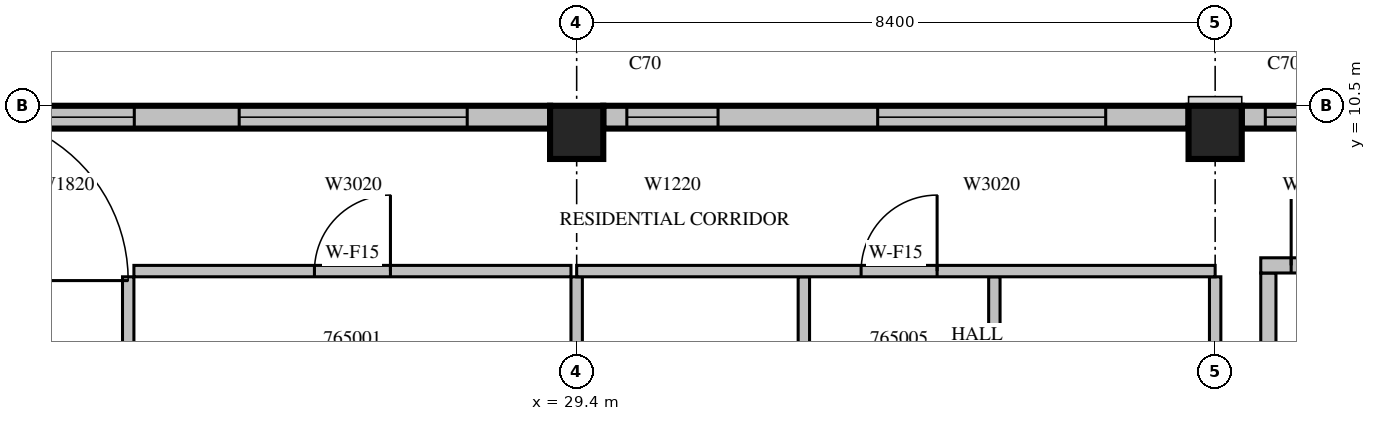
"""IFC4 building model, lengths in metres.
Left out: names, types, materials, properties, quantities, classifications, styles, units other than length and angle.
Written with IfcOpenShell. Run it as: python <this file> out.ifc"""

import sys

from ifc_helpers import new_model, si_unit, direction, frame, frame_2d, origin, origin_2d, place, context, subcontext, project, spatial, rectangle, extrude, source, transform, mapped, element, fill, save


model = new_model("IFC4")
c1 = context("Model", 3, precision=1e-05, world=origin(), true_north=direction((0.0, 1.0)))
c2 = subcontext(c1, "Body", "Model", "MODEL_VIEW")
j1 = project(units=[si_unit("LENGTHUNIT", "METRE"), si_unit("PLANEANGLEUNIT", "RADIAN")], contexts=[c1])
p1 = place(None, origin())
s1 = spatial("IfcSite", under=j1, at=p1, CompositionType="ELEMENT")
p2 = place(p1, origin())
s2 = spatial("IfcBuilding", under=s1, at=p2, CompositionType="ELEMENT")
p3 = place(p2, frame((0.0, 0.0, 288.0)))
s3 = spatial("IfcBuildingStorey", under=s2, at=p3, CompositionType="ELEMENT", Elevation=288.0)
m1 = source(origin(), c2, "Body", "SweptSolid", [
    extrude(rectangle(XDim=0.7, YDim=0.7, at=origin_2d()), origin(), (0.0, 0.0, 1.0), 3.5),
])
for number, where, z_axis, x_axis in (
    (1, (29.4, 10.15, 0.0), (0.0, 0.0, 1.0), (1.0, 0.0, 0.0)),
    (2, (37.8, 10.15, 0.0), (0.0, 0.0, 1.0), (1.0, 0.0, 0.0)),
):
    element("IfcColumn", number, at=place(p3, frame(where, z_axis=z_axis, x_axis=x_axis)), inside=s3, PredefinedType="COLUMN", context=c2, shape_type="MappedRepresentation", body=[
        mapped(m1, transform((0.0, 0.0, 0.0), scale=1.0)),
    ])
m2 = source(origin(), c2, "Body", "SweptSolid", [
    extrude(rectangle(XDim=7.7, YDim=0.3, at=frame_2d((3.85, 0.0))), origin(), (0.0, 0.0, 1.0), 3.1),
])
p4 = place(p3, frame((45.85, 10.35, 0.0), z_axis=(0.0, 0.0, 1.0), x_axis=(-1.0, 0.0, 0.0)))
e3 = element("IfcWall", 3, at=p4, inside=s3, PredefinedType="STANDARD", context=c2, shape_type="MappedRepresentation", body=[
    mapped(m2, transform((0.0, 0.0, 0.0), scale=1.0)),
])
m3 = source(origin(), c2, "Body", "SweptSolid", [
    extrude(rectangle(XDim=3.0, YDim=2.0, at=frame_2d((1.5, 1.0))), frame((0.0, 0.16, 0.0), z_axis=(0.0, -1.0, 0.0), x_axis=(1.0, 0.0, 0.0)), (0.0, 0.0, 1.0), 0.32),
])
p5 = place(p4, frame((1.09, 0.0, 0.6)))
e4 = element("IfcOpeningElement", 4, at=p5, cuts=e3, PredefinedType="OPENING", context=c2, shape_type="MappedRepresentation", body=[
    mapped(m3, transform((0.0, 0.0, 0.0), scale=1.0)),
])
m4 = source(origin(), c2, "Body", "SweptSolid", [
    extrude(rectangle(XDim=1.2, YDim=2.0, at=frame_2d((0.6, 1.0))), frame((0.0, 0.16, 0.0), z_axis=(0.0, -1.0, 0.0), x_axis=(1.0, 0.0, 0.0)), (0.0, 0.0, 1.0), 0.32),
])
p6 = place(p4, frame((6.19, 0.0, 0.6)))
e5 = element("IfcOpeningElement", 5, at=p6, cuts=e3, PredefinedType="OPENING", context=c2, shape_type="MappedRepresentation", body=[
    mapped(m4, transform((0.0, 0.0, 0.0), scale=1.0)),
])
p7 = place(p3, frame((37.45, 10.35, 0.0), z_axis=(0.0, 0.0, 1.0), x_axis=(-1.0, 0.0, 0.0)))
e6 = element("IfcWall", 6, at=p7, inside=s3, PredefinedType="STANDARD", context=c2, shape_type="MappedRepresentation", body=[
    mapped(m2, transform((0.0, 0.0, 0.0), scale=1.0)),
])
p8 = place(p7, frame((1.09, 0.0, 0.6)))
e7 = element("IfcOpeningElement", 7, at=p8, cuts=e6, PredefinedType="OPENING", context=c2, shape_type="MappedRepresentation", body=[
    mapped(m3, transform((0.0, 0.0, 0.0), scale=1.0)),
])
p9 = place(p7, frame((6.19, 0.0, 0.6)))
e8 = element("IfcOpeningElement", 8, at=p9, cuts=e6, PredefinedType="OPENING", context=c2, shape_type="MappedRepresentation", body=[
    mapped(m4, transform((0.0, 0.0, 0.0), scale=1.0)),
])
m5 = source(origin(), c2, "Body", "SweptSolid", [
    extrude(rectangle(XDim=7.45, YDim=0.3, at=frame_2d((3.725, 0.0))), origin(), (0.0, 0.0, 1.0), 3.1),
])
p10 = place(p3, frame((29.05, 10.35, 0.0), z_axis=(0.0, 0.0, 1.0), x_axis=(-1.0, 0.0, 0.0)))
e9 = element("IfcWall", 9, at=p10, inside=s3, PredefinedType="STANDARD", context=c2, shape_type="MappedRepresentation", body=[
    mapped(m5, transform((0.0, 0.0, 0.0), scale=1.0)),
])
p11 = place(p10, frame((1.09, 0.0, 0.6)))
e10 = element("IfcOpeningElement", 10, at=p11, cuts=e9, PredefinedType="OPENING", context=c2, shape_type="MappedRepresentation", body=[
    mapped(m3, transform((0.0, 0.0, 0.0), scale=1.0)),
])
m6 = source(origin(), c2, "Body", "SweptSolid", [
    extrude(rectangle(XDim=1.8, YDim=2.0, at=frame_2d((0.9, 1.0))), frame((0.0, 0.16, 0.0), z_axis=(0.0, -1.0, 0.0), x_axis=(1.0, 0.0, 0.0)), (0.0, 0.0, 1.0), 0.32),
])
p12 = place(p10, frame((5.47, 0.0, 0.6)))
e11 = element("IfcOpeningElement", 11, at=p12, cuts=e9, PredefinedType="OPENING", context=c2, shape_type="MappedRepresentation", body=[
    mapped(m6, transform((0.0, 0.0, 0.0), scale=1.0)),
])
m7 = source(origin(), c2, "Body", "SweptSolid", [
    extrude(rectangle(XDim=8.0, YDim=0.2, at=frame_2d((4.0, 0.0))), origin(), (0.0, 0.0, 1.0), 3.1),
])
p13 = place(p3, frame((38.5, 0.3, 0.0), z_axis=(0.0, 0.0, 1.0), x_axis=(0.0, 1.0, 0.0)))
e12 = element("IfcWall", 12, at=p13, inside=s3, PredefinedType="PARTITIONING", context=c2, shape_type="MappedRepresentation", body=[
    mapped(m7, transform((0.0, 0.0, 0.0), scale=1.0)),
])
m8 = source(origin(), c2, "Body", "SweptSolid", [
    extrude(rectangle(XDim=5.45, YDim=0.2, at=frame_2d((2.725, 0.0))), origin(), (0.0, 0.0, 1.0), 3.1),
])
p14 = place(p3, frame((38.4, 8.4, 0.0), z_axis=(0.0, 0.0, 1.0), x_axis=(1.0, 0.0, 0.0)))
e13 = element("IfcWall", 13, at=p14, inside=s3, PredefinedType="PARTITIONING", context=c2, shape_type="MappedRepresentation", body=[
    mapped(m8, transform((0.0, 0.0, 0.0), scale=1.0)),
])
m9 = source(origin(), c2, "Body", "SweptSolid", [
    extrude(rectangle(XDim=1.2, YDim=2.1, at=frame_2d((0.6, 1.05))), frame((0.0, 0.11, 0.0), z_axis=(0.0, -1.0, 0.0), x_axis=(1.0, 0.0, 0.0)), (0.0, 0.0, 1.0), 0.22),
])
p15 = place(p14, frame((0.4, 0.0, 0.0)))
e14 = element("IfcOpeningElement", 14, at=p15, cuts=e13, PredefinedType="OPENING", context=c2, shape_type="MappedRepresentation", body=[
    mapped(m9, transform((0.0, 0.0, 0.0), scale=1.0)),
])
m10 = source(origin(), c2, "Body", "SweptSolid", [
    extrude(rectangle(XDim=0.9, YDim=2.1, at=frame_2d((0.45, 1.05))), frame((0.0, 0.11, 0.0), z_axis=(0.0, -1.0, 0.0), x_axis=(1.0, 0.0, 0.0)), (0.0, 0.0, 1.0), 0.22),
])
p16 = place(p14, frame((3.25, 0.0, 0.0)))
e15 = element("IfcOpeningElement", 15, at=p16, cuts=e13, PredefinedType="OPENING", context=c2, shape_type="MappedRepresentation", body=[
    mapped(m10, transform((0.0, 0.0, 0.0), scale=1.0)),
])
m11 = source(origin(), c2, "Body", "SweptSolid", [
    extrude(rectangle(XDim=4.575, YDim=0.15, at=frame_2d((2.288, 0.0))), origin(), (0.0, 0.0, 1.0), 3.1),
])
p17 = place(p3, frame((23.5, 8.25, 0.0), z_axis=(0.0, 0.0, 1.0), x_axis=(0.0, -1.0, 0.0)))
e16 = element("IfcWall", 16, at=p17, inside=s3, PredefinedType="PARTITIONING", context=c2, shape_type="MappedRepresentation", body=[
    mapped(m11, transform((0.0, 0.0, 0.0), scale=1.0)),
])
m12 = source(origin(), c2, "Body", "SweptSolid", [
    extrude(rectangle(XDim=0.9, YDim=2.1, at=frame_2d((0.45, 1.05))), frame((0.0, 0.085, 0.0), z_axis=(0.0, -1.0, 0.0), x_axis=(1.0, 0.0, 0.0)), (0.0, 0.0, 1.0), 0.17),
])
p18 = place(p17, frame((2.981, 0.0, 0.0)))
e17 = element("IfcOpeningElement", 17, at=p18, cuts=e16, PredefinedType="OPENING", context=c2, shape_type="MappedRepresentation", body=[
    mapped(m12, transform((0.0, 0.0, 0.0), scale=1.0)),
])
p19 = place(p3, frame((29.4, 3.675, 0.0), z_axis=(0.0, 0.0, 1.0), x_axis=(0.0, 1.0, 0.0)))
e18 = element("IfcWall", 18, at=p19, inside=s3, PredefinedType="PARTITIONING", context=c2, shape_type="MappedRepresentation", body=[
    mapped(m11, transform((0.0, 0.0, 0.0), scale=1.0)),
])
m13 = source(origin(), c2, "Body", "SweptSolid", [
    extrude(rectangle(XDim=5.75, YDim=0.15, at=frame_2d((2.875, 0.0))), origin(), (0.0, 0.0, 1.0), 3.1),
])
p20 = place(p3, frame((29.325, 8.325, 0.0), z_axis=(0.0, 0.0, 1.0), x_axis=(-1.0, 0.0, 0.0)))
e19 = element("IfcWall", 19, at=p20, inside=s3, PredefinedType="PARTITIONING", context=c2, shape_type="MappedRepresentation", body=[
    mapped(m13, transform((0.0, 0.0, 0.0), scale=1.0)),
])
m14 = source(origin(), c2, "Body", "SweptSolid", [
    extrude(rectangle(XDim=1.0, YDim=2.1, at=frame_2d((0.5, 1.05))), frame((0.0, 0.085, 0.0), z_axis=(0.0, -1.0, 0.0), x_axis=(1.0, 0.0, 0.0)), (0.0, 0.0, 1.0), 0.17),
])
p21 = place(p20, frame((2.375, 0.0, 0.0)))
e20 = element("IfcOpeningElement", 20, at=p21, cuts=e19, PredefinedType="OPENING", context=c2, shape_type="MappedRepresentation", body=[
    mapped(m14, transform((0.0, 0.0, 0.0), scale=1.0)),
])
m15 = source(origin(), c2, "Body", "SweptSolid", [
    extrude(rectangle(XDim=3.2, YDim=0.15, at=frame_2d((1.6, 0.0))), origin(), (0.0, 0.0, 1.0), 3.1),
])
p22 = place(p3, frame((32.389, 5.05, 0.0), z_axis=(0.0, 0.0, 1.0), x_axis=(0.0, 1.0, 0.0)))
e21 = element("IfcWall", 21, at=p22, inside=s3, PredefinedType="PARTITIONING", context=c2, shape_type="MappedRepresentation", body=[
    mapped(m15, transform((0.0, 0.0, 0.0), scale=1.0)),
])
p23 = place(p22, frame((1.15, 0.0, 0.0)))
e22 = element("IfcOpeningElement", 22, at=p23, cuts=e21, PredefinedType="OPENING", context=c2, shape_type="MappedRepresentation", body=[
    mapped(m12, transform((0.0, 0.0, 0.0), scale=1.0)),
])
p24 = place(p3, frame((34.895, 5.05, 0.0), z_axis=(0.0, 0.0, 1.0), x_axis=(0.0, 1.0, 0.0)))
e23 = element("IfcWall", 23, at=p24, inside=s3, PredefinedType="PARTITIONING", context=c2, shape_type="MappedRepresentation", body=[
    mapped(m15, transform((0.0, 0.0, 0.0), scale=1.0)),
])
p25 = place(p24, frame((1.15, 0.0, 0.0)))
e24 = element("IfcOpeningElement", 24, at=p25, cuts=e23, PredefinedType="OPENING", context=c2, shape_type="MappedRepresentation", body=[
    mapped(m12, transform((0.0, 0.0, 0.0), scale=1.0)),
])
p26 = place(p3, frame((37.8, 5.05, 0.0), z_axis=(0.0, 0.0, 1.0), x_axis=(0.0, 1.0, 0.0)))
e25 = element("IfcWall", 25, at=p26, inside=s3, PredefinedType="PARTITIONING", context=c2, shape_type="MappedRepresentation", body=[
    mapped(m15, transform((0.0, 0.0, 0.0), scale=1.0)),
])
m16 = source(origin(), c2, "Body", "SweptSolid", [
    extrude(rectangle(XDim=8.4, YDim=0.15, at=frame_2d((4.2, 0.0))), origin(), (0.0, 0.0, 1.0), 3.1),
])
p27 = place(p3, frame((37.8, 8.325, 0.0), z_axis=(0.0, 0.0, 1.0), x_axis=(-1.0, 0.0, 0.0)))
e26 = element("IfcWall", 26, at=p27, inside=s3, PredefinedType="PARTITIONING", context=c2, shape_type="MappedRepresentation", body=[
    mapped(m16, transform((0.0, 0.0, 0.0), scale=1.0)),
])
p28 = place(p27, frame((3.658, 0.0, 0.0)))
e27 = element("IfcOpeningElement", 27, at=p28, cuts=e26, PredefinedType="OPENING", context=c2, shape_type="MappedRepresentation", body=[
    mapped(m14, transform((0.0, 0.0, 0.0), scale=1.0)),
])
m17 = source(origin(), c2, "Body", "SweptSolid", [
    extrude(rectangle(XDim=1.2, YDim=2.0, at=frame_2d((0.6, 1.0))), frame((0.0, 0.03, 0.0), z_axis=(0.0, -1.0, 0.0), x_axis=(1.0, 0.0, 0.0)), (0.0, 0.0, 1.0), 0.06),
])
p29 = place(p6, origin())
e28 = element("IfcWindow", 28, at=p29, inside=s3, PartitioningType="SINGLE_PANEL", PredefinedType="WINDOW", context=c2, shape_type="MappedRepresentation", body=[
    mapped(m17, transform((0.0, 0.0, 0.0), scale=1.0)),
])
fill(e5, e28)
m18 = source(origin(), c2, "Body", "SweptSolid", [
    extrude(rectangle(XDim=3.0, YDim=2.0, at=frame_2d((1.5, 1.0))), frame((0.0, 0.03, 0.0), z_axis=(0.0, -1.0, 0.0), x_axis=(1.0, 0.0, 0.0)), (0.0, 0.0, 1.0), 0.06),
])
p30 = place(p8, origin())
e29 = element("IfcWindow", 29, at=p30, inside=s3, PartitioningType="SINGLE_PANEL", PredefinedType="WINDOW", context=c2, shape_type="MappedRepresentation", body=[
    mapped(m18, transform((0.0, 0.0, 0.0), scale=1.0)),
])
fill(e7, e29)
p31 = place(p9, origin())
e30 = element("IfcWindow", 30, at=p31, inside=s3, PartitioningType="SINGLE_PANEL", PredefinedType="WINDOW", context=c2, shape_type="MappedRepresentation", body=[
    mapped(m17, transform((0.0, 0.0, 0.0), scale=1.0)),
])
fill(e8, e30)
p32 = place(p11, origin())
e31 = element("IfcWindow", 31, at=p32, inside=s3, PartitioningType="SINGLE_PANEL", PredefinedType="WINDOW", context=c2, shape_type="MappedRepresentation", body=[
    mapped(m18, transform((0.0, 0.0, 0.0), scale=1.0)),
])
fill(e10, e31)
m19 = source(origin(), c2, "Body", "SweptSolid", [
    extrude(rectangle(XDim=1.8, YDim=2.0, at=frame_2d((0.9, 1.0))), frame((0.0, 0.03, 0.0), z_axis=(0.0, -1.0, 0.0), x_axis=(1.0, 0.0, 0.0)), (0.0, 0.0, 1.0), 0.06),
])
p33 = place(p12, origin())
e32 = element("IfcWindow", 32, at=p33, inside=s3, PartitioningType="SINGLE_PANEL", PredefinedType="WINDOW", context=c2, shape_type="MappedRepresentation", body=[
    mapped(m19, transform((0.0, 0.0, 0.0), scale=1.0)),
])
fill(e11, e32)
m20 = source(origin(), c2, "Body", "SweptSolid", [
    extrude(rectangle(XDim=1.2, YDim=2.1, at=frame_2d((0.6, 1.05))), frame((0.0, 0.025, 0.0), z_axis=(0.0, -1.0, 0.0), x_axis=(1.0, 0.0, 0.0)), (0.0, 0.0, 1.0), 0.05),
])
p34 = place(p15, origin())
e33 = element("IfcDoor", 33, at=p34, inside=s3, OperationType="SINGLE_SWING_LEFT", PredefinedType="DOOR", context=c2, shape_type="MappedRepresentation", body=[
    mapped(m20, transform((0.0, 0.0, 0.0), scale=1.0)),
])
fill(e14, e33)
m21 = source(origin(), c2, "Body", "SweptSolid", [
    extrude(rectangle(XDim=1.0, YDim=2.1, at=frame_2d((0.5, 1.05))), frame((0.0, 0.025, 0.0), z_axis=(0.0, -1.0, 0.0), x_axis=(1.0, 0.0, 0.0)), (0.0, 0.0, 1.0), 0.05),
])
p35 = place(p21, origin())
e34 = element("IfcDoor", 34, at=p35, inside=s3, OperationType="SINGLE_SWING_RIGHT", PredefinedType="DOOR", context=c2, shape_type="MappedRepresentation", body=[
    mapped(m21, transform((0.0, 0.0, 0.0), scale=1.0)),
])
fill(e20, e34)
p36 = place(p28, origin())
e35 = element("IfcDoor", 35, at=p36, inside=s3, OperationType="SINGLE_SWING_RIGHT", PredefinedType="DOOR", context=c2, shape_type="MappedRepresentation", body=[
    mapped(m21, transform((0.0, 0.0, 0.0), scale=1.0)),
])
fill(e27, e35)
save(model, sys.argv[1])
